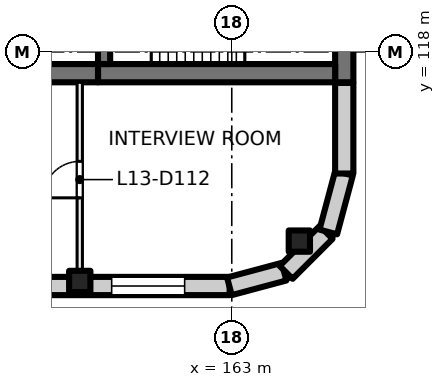
"""IFC4 building model, lengths in metres.
Left out: names, types, materials, properties, quantities, classifications, styles, units other than length and angle.
Written with IfcOpenShell. Run it as: python <this file> out.ifc"""

import sys

from ifc_helpers import new_model, si_unit, direction, frame, frame_2d, origin, origin_2d, place, context, subcontext, project, spatial, rectangle, extrude, element, fill, save


model = new_model("IFC4")
c1 = context("Model", 3, precision=1e-05, world=origin(), true_north=direction((0.0, 1.0)))
c2 = subcontext(c1, "Body", "Model", "MODEL_VIEW")
j1 = project(units=[si_unit("LENGTHUNIT", "METRE"), si_unit("PLANEANGLEUNIT", "RADIAN")], contexts=[c1])
p1 = place(None, origin())
s1 = spatial("IfcSite", under=j1, at=p1, CompositionType="ELEMENT")
p2 = place(p1, origin())
s2 = spatial("IfcBuilding", under=s1, at=p2, CompositionType="ELEMENT")
p3 = place(p2, frame((0.0, 0.0, 59.5)))
s3 = spatial("IfcBuildingStorey", under=s2, at=p3, CompositionType="ELEMENT", Elevation=59.5)
for number, where, z_axis, x_axis in (
    (1, (165.223, 111.777, 0.0), (0.0, 0.0, 1.0), (1.0, 0.0, 0.0)),
    (2, (158.0, 110.45, 0.0), (0.0, 0.0, 1.0), (1.0, 0.0, 0.0)),
):
    element("IfcColumn", number, at=place(p3, frame(where, z_axis=z_axis, x_axis=x_axis)), inside=s3, PredefinedType="COLUMN", context=c2, shape_type="SweptSolid", body=[
        extrude(rectangle(XDim=0.7, YDim=0.7, at=origin_2d()), origin(), (0.0, 0.0, 1.0), 4.0),
    ])
p4 = place(p3, frame((166.7, 120.8, 0.0), z_axis=(0.0, 0.0, 1.0), x_axis=(0.0, -1.0, 0.0)))
e3 = element("IfcWall", 3, at=p4, inside=s3, PredefinedType="SHEAR", context=c2, shape_type="SweptSolid", body=[
    extrude(rectangle(XDim=3.8, YDim=0.6, at=frame_2d((1.9, 0.0))), origin(), (0.0, 0.0, 1.0), 4.0),
])
p5 = place(p3, frame((166.4, 117.3, 0.0), z_axis=(0.0, 0.0, 1.0), x_axis=(-1.0, 0.0, 0.0)))
e4 = element("IfcWall", 4, at=p5, inside=s3, PredefinedType="SHEAR", context=c2, shape_type="SweptSolid", body=[
    extrude(rectangle(XDim=7.8, YDim=0.6, at=frame_2d((3.9, 0.0))), origin(), (0.0, 0.0, 1.0), 4.0),
])
p6 = place(p3, frame((158.6, 117.3, 0.0), z_axis=(0.0, 0.0, 1.0), x_axis=(-1.0, 0.0, 0.0)))
e5 = element("IfcWall", 5, at=p6, inside=s3, PredefinedType="SHEAR", context=c2, shape_type="SweptSolid", body=[
    extrude(rectangle(XDim=4.6, YDim=0.6, at=frame_2d((2.3, 0.0))), origin(), (0.0, 0.0, 1.0), 4.0),
])
p7 = place(p3, frame((158.8, 120.4, 0.0), z_axis=(0.0, 0.0, 1.0), x_axis=(0.0, -1.0, 0.0)))
e6 = element("IfcWall", 6, at=p7, inside=s3, PredefinedType="SHEAR", context=c2, shape_type="SweptSolid", body=[
    extrude(rectangle(XDim=2.8, YDim=0.4, at=frame_2d((1.4, 0.0))), origin(), (0.0, 0.0, 1.0), 4.0),
])
p8 = place(p7, frame((0.9, 0.0, 0.0)))
e7 = element("IfcOpeningElement", 7, at=p8, cuts=e6, PredefinedType="OPENING", context=c2, shape_type="SweptSolid", body=[
    extrude(rectangle(XDim=1.0, YDim=2.1, at=frame_2d((0.5, 1.05))), frame((0.0, 0.21, 0.0), z_axis=(0.0, -1.0, 0.0), x_axis=(1.0, 0.0, 0.0)), (0.0, 0.0, 1.0), 0.42),
])
p9 = place(p3, frame((162.93, 110.3, 0.0), z_axis=(0.0, 0.0, 1.0), x_axis=(-1.0, 0.0, 0.0)))
e8 = element("IfcWall", 8, at=p9, inside=s3, PredefinedType="SOLIDWALL", context=c2, shape_type="SweptSolid", body=[
    extrude(rectangle(XDim=31.93, YDim=0.6, at=frame_2d((15.965, 0.0))), origin(), (0.0, 0.0, 1.0), 3.625),
])
p10 = place(p9, frame((1.48, 0.0, 0.9)))
e9 = element("IfcOpeningElement", 9, at=p10, cuts=e8, PredefinedType="OPENING", context=c2, shape_type="SweptSolid", body=[
    extrude(rectangle(XDim=2.4, YDim=2.4, at=frame_2d((1.2, 1.2))), frame((0.0, 0.31, 0.0), z_axis=(0.0, -1.0, 0.0), x_axis=(1.0, 0.0, 0.0)), (0.0, 0.0, 1.0), 0.62),
])
p11 = place(p9, frame((5.98, 0.0, 0.9)))
e10 = element("IfcOpeningElement", 10, at=p11, cuts=e8, PredefinedType="OPENING", context=c2, shape_type="SweptSolid", body=[
    extrude(rectangle(XDim=2.4, YDim=2.4, at=frame_2d((1.2, 1.2))), frame((0.0, 0.31, 0.0), z_axis=(0.0, -1.0, 0.0), x_axis=(1.0, 0.0, 0.0)), (0.0, 0.0, 1.0), 0.62),
])
p12 = place(p9, frame((10.48, 0.0, 0.9)))
e11 = element("IfcOpeningElement", 11, at=p12, cuts=e8, PredefinedType="OPENING", context=c2, shape_type="SweptSolid", body=[
    extrude(rectangle(XDim=2.4, YDim=2.4, at=frame_2d((1.2, 1.2))), frame((0.0, 0.31, 0.0), z_axis=(0.0, -1.0, 0.0), x_axis=(1.0, 0.0, 0.0)), (0.0, 0.0, 1.0), 0.62),
])
p13 = place(p9, frame((14.98, 0.0, 0.9)))
e12 = element("IfcOpeningElement", 12, at=p13, cuts=e8, PredefinedType="OPENING", context=c2, shape_type="SweptSolid", body=[
    extrude(rectangle(XDim=2.4, YDim=2.4, at=frame_2d((1.2, 1.2))), frame((0.0, 0.31, 0.0), z_axis=(0.0, -1.0, 0.0), x_axis=(1.0, 0.0, 0.0)), (0.0, 0.0, 1.0), 0.62),
])
p14 = place(p9, frame((19.48, 0.0, 0.9)))
e13 = element("IfcOpeningElement", 13, at=p14, cuts=e8, PredefinedType="OPENING", context=c2, shape_type="SweptSolid", body=[
    extrude(rectangle(XDim=2.4, YDim=2.4, at=frame_2d((1.2, 1.2))), frame((0.0, 0.31, 0.0), z_axis=(0.0, -1.0, 0.0), x_axis=(1.0, 0.0, 0.0)), (0.0, 0.0, 1.0), 0.62),
])
p15 = place(p9, frame((23.98, 0.0, 0.9)))
e14 = element("IfcOpeningElement", 14, at=p15, cuts=e8, PredefinedType="OPENING", context=c2, shape_type="SweptSolid", body=[
    extrude(rectangle(XDim=2.4, YDim=2.4, at=frame_2d((1.2, 1.2))), frame((0.0, 0.31, 0.0), z_axis=(0.0, -1.0, 0.0), x_axis=(1.0, 0.0, 0.0)), (0.0, 0.0, 1.0), 0.62),
])
p16 = place(p9, frame((28.48, 0.0, 0.9)))
e15 = element("IfcOpeningElement", 15, at=p16, cuts=e8, PredefinedType="OPENING", context=c2, shape_type="SweptSolid", body=[
    extrude(rectangle(XDim=2.4, YDim=2.4, at=frame_2d((1.2, 1.2))), frame((0.0, 0.31, 0.0), z_axis=(0.0, -1.0, 0.0), x_axis=(1.0, 0.0, 0.0)), (0.0, 0.0, 1.0), 0.62),
])
for number, where, z_axis, x_axis in (
    (16, (164.719, 110.771, 0.0), (0.0, 0.0, 1.0), (-0.966, -0.259, 0.0)),
    (17, (166.104, 112.064, 0.0), (0.0, 0.0, 1.0), (-0.707, -0.707, 0.0)),
):
    element("IfcWall", number, at=place(p3, frame(where, z_axis=z_axis, x_axis=x_axis)), inside=s3, PredefinedType="SOLIDWALL", context=c2, shape_type="SweptSolid", body=[
        extrude(rectangle(XDim=1.861, YDim=0.6, at=frame_2d((0.93, 0.0))), origin(), (0.0, 0.0, 1.0), 3.625),
    ])
p17 = place(p3, frame((166.692, 114.01, 0.0), z_axis=(0.0, 0.0, 1.0), x_axis=(-0.258839784042, -0.965920269068, 0.0)))
e18 = element("IfcWall", 18, at=p17, inside=s3, PredefinedType="SOLIDWALL", context=c2, shape_type="SweptSolid", body=[
    extrude(rectangle(XDim=2.0, YDim=0.6, at=frame_2d((1.0, 0.0))), origin(), (0.0, 0.0, 1.0), 3.625),
])
p18 = place(p3, frame((166.7, 116.98, 0.0), z_axis=(0.0, 0.0, 1.0), x_axis=(0.0, -1.0, 0.0)))
e19 = element("IfcWall", 19, at=p18, inside=s3, PredefinedType="SOLIDWALL", context=c2, shape_type="SweptSolid", body=[
    extrude(rectangle(XDim=2.98, YDim=0.6, at=frame_2d((1.49, 0.0))), origin(), (0.0, 0.0, 1.0), 3.625),
])
p19 = place(p3, frame((158.0, 110.6, 0.0), z_axis=(0.0, 0.0, 1.0), x_axis=(0.0, 1.0, 0.0)))
e20 = element("IfcWall", 20, at=p19, inside=s3, PredefinedType="PARTITIONING", context=c2, shape_type="SweptSolid", body=[
    extrude(rectangle(XDim=6.4, YDim=0.175, at=frame_2d((3.2, 0.0))), origin(), (0.0, 0.0, 1.0), 3.625),
])
p20 = place(p19, frame((2.6, 0.0, 0.0)))
e21 = element("IfcOpeningElement", 21, at=p20, cuts=e20, PredefinedType="OPENING", context=c2, shape_type="SweptSolid", body=[
    extrude(rectangle(XDim=1.2, YDim=2.1, at=frame_2d((0.6, 1.05))), frame((0.0, 0.097, 0.0), z_axis=(0.0, -1.0, 0.0), x_axis=(1.0, 0.0, 0.0)), (0.0, 0.0, 1.0), 0.195),
])
p21 = place(p10, origin())
e22 = element("IfcWindow", 22, at=p21, inside=s3, PartitioningType="SINGLE_PANEL", PredefinedType="WINDOW", context=c2, shape_type="SweptSolid", body=[
    extrude(rectangle(XDim=2.4, YDim=2.4, at=frame_2d((1.2, 1.2))), frame((0.0, 0.03, 0.0), z_axis=(0.0, -1.0, 0.0), x_axis=(1.0, 0.0, 0.0)), (0.0, 0.0, 1.0), 0.06),
])
fill(e9, e22)
p22 = place(p20, origin())
e23 = element("IfcDoor", 23, at=p22, inside=s3, OperationType="DOUBLE_DOOR_SINGLE_SWING", PredefinedType="DOOR", context=c2, shape_type="SweptSolid", body=[
    extrude(rectangle(XDim=1.2, YDim=2.1, at=frame_2d((0.6, 1.05))), frame((0.0, 0.025, 0.0), z_axis=(0.0, -1.0, 0.0), x_axis=(1.0, 0.0, 0.0)), (0.0, 0.0, 1.0), 0.05),
])
fill(e21, e23)
save(model, sys.argv[1])
